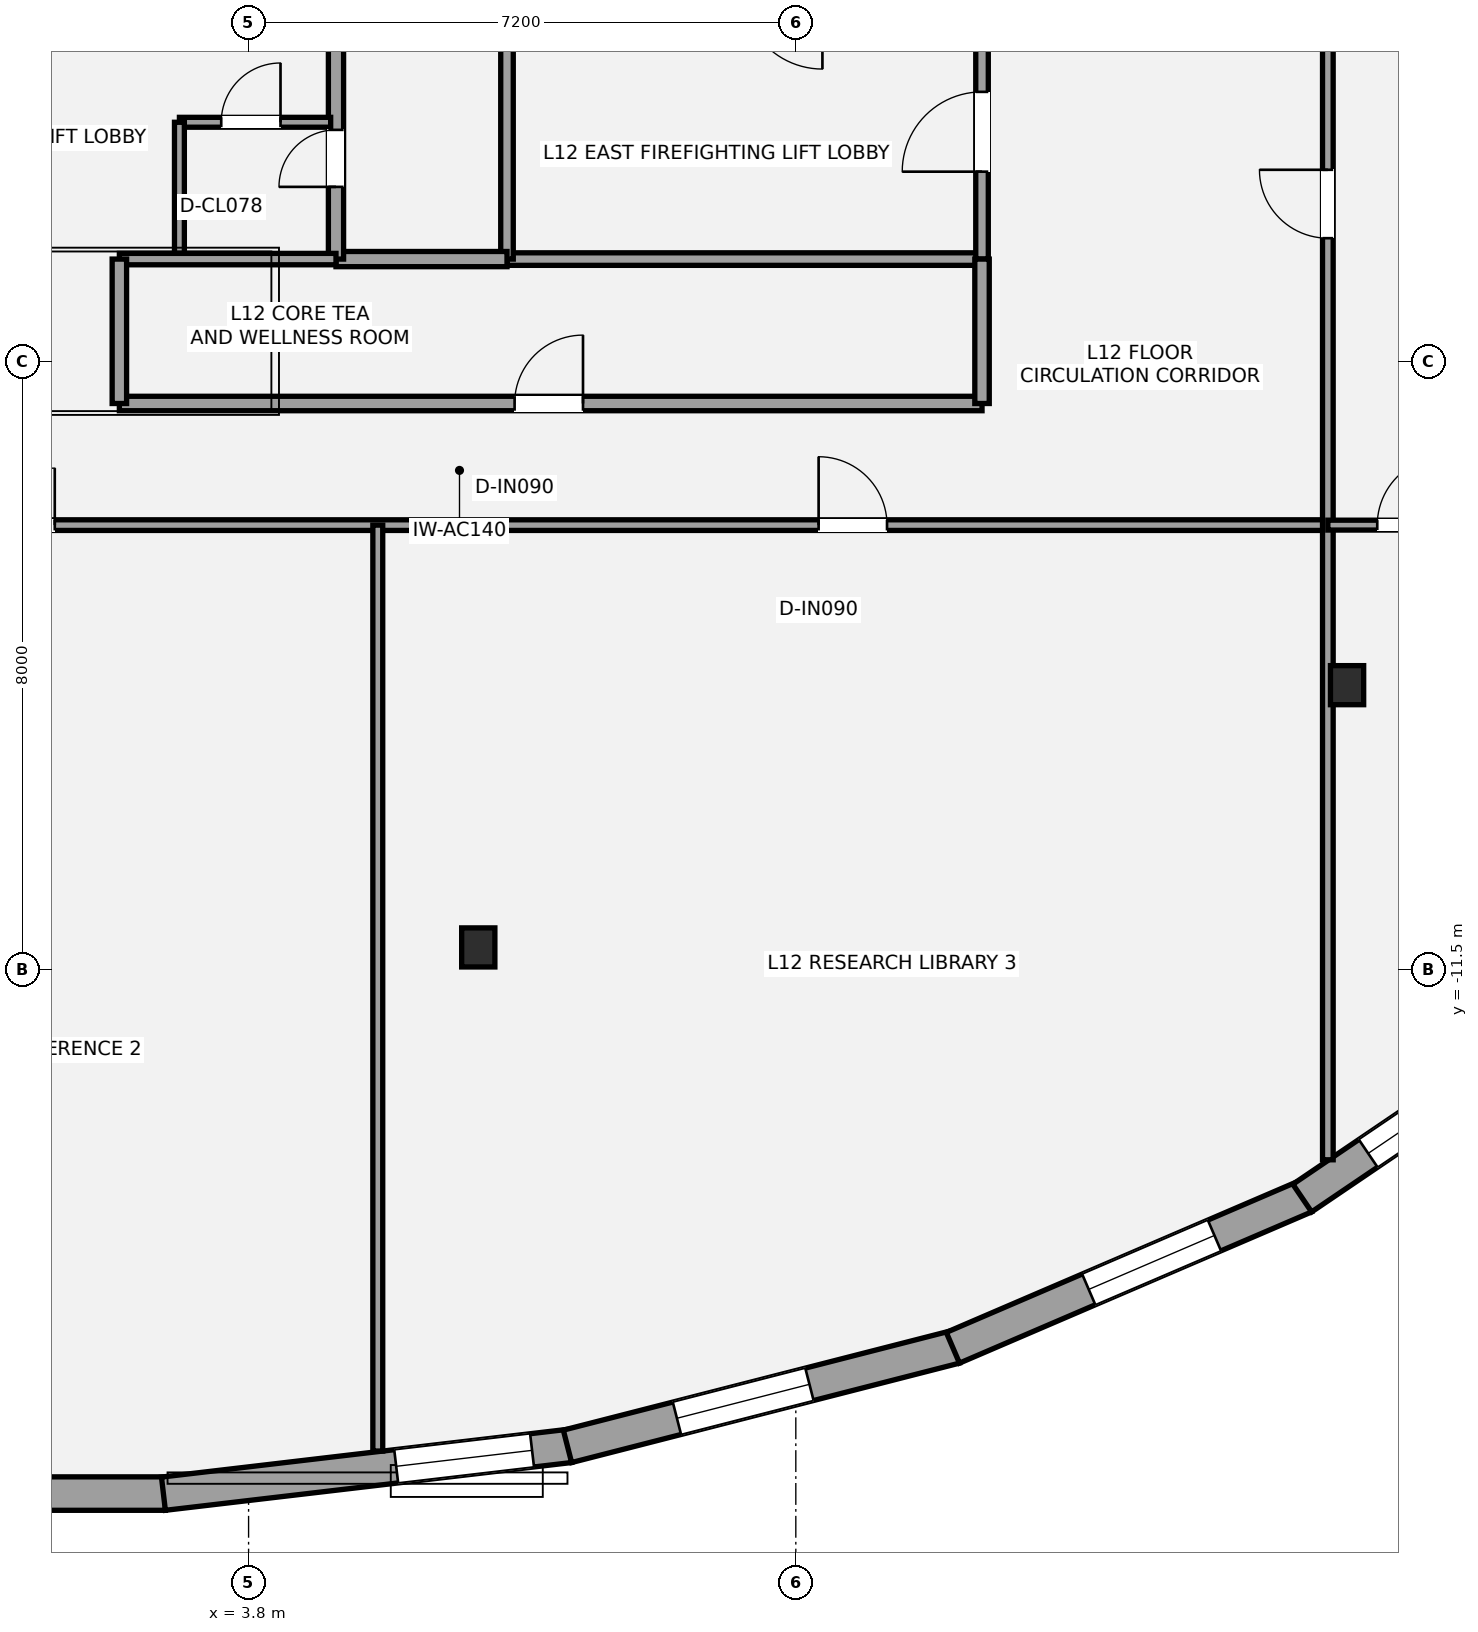
"""IFC4 building model, lengths in metres.
Left out: names, types, materials, properties, quantities, classifications, styles, units other than length and angle.
Written with IfcOpenShell. Run it as: python <this file> out.ifc"""

import sys

from ifc_helpers import new_model, si_unit, direction, frame, frame_2d, origin, origin_2d, place, context, subcontext, project, spatial, rectangle, i_section, extrude, element, fill, save


model = new_model("IFC4")
c1 = context("Model", 3, precision=1e-05, world=origin(), true_north=direction((0.0, 1.0)))
c2 = subcontext(c1, "Body", "Model", "MODEL_VIEW")
j1 = project(units=[si_unit("LENGTHUNIT", "METRE"), si_unit("PLANEANGLEUNIT", "RADIAN")], contexts=[c1])
p1 = place(None, origin())
s1 = spatial("IfcSite", under=j1, at=p1, CompositionType="ELEMENT")
p2 = place(p1, origin())
s2 = spatial("IfcBuilding", under=s1, at=p2, CompositionType="ELEMENT")
p3 = place(p2, frame((0.0, 0.0, 48.6)))
s3 = spatial("IfcBuildingStorey", under=s2, at=p3, CompositionType="ELEMENT", Elevation=48.6)
for number, where, z_axis, x_axis in (
    (1, (6.822, -11.206, 0.0), (0.0, 0.0, 1.0), (1.0, 0.0, 0.0)),
    (2, (18.253, -7.756, 0.0), (0.0, 0.0, 1.0), (1.0, 0.0, 0.0)),
):
    element("IfcColumn", number, at=place(p3, frame(where, z_axis=z_axis, x_axis=x_axis)), inside=s3, PredefinedType="COLUMN", context=c2, shape_type="SweptSolid", body=[
        extrude(i_section(OverallWidth=0.437, OverallDepth=0.514, WebThickness=0.061, FlangeThickness=0.097, at=origin_2d()), origin(), (0.0, 0.0, 1.0), 3.6),
    ])
p4 = place(p3, frame((2.705, -18.391, 0.0), z_axis=(0.0, 0.0, 1.0), x_axis=(-1.0, 0.0, 0.0)))
e3 = element("IfcWall", 3, at=p4, inside=s3, PredefinedType="STANDARD", context=c2, shape_type="SweptSolid", body=[
    extrude(rectangle(XDim=5.41, YDim=0.44, at=frame_2d((2.705, 0.0))), origin(), (0.0, 0.0, 1.0), 2.529),
])
p5 = place(p4, frame((2.028, 0.0, 0.65)))
e4 = element("IfcOpeningElement", 4, at=p5, cuts=e3, PredefinedType="OPENING", context=c2, shape_type="SweptSolid", body=[
    extrude(rectangle(XDim=1.8, YDim=1.7, at=frame_2d((0.9, 0.85))), frame((0.0, 0.23, 0.0), z_axis=(0.0, -1.0, 0.0), x_axis=(1.0, 0.0, 0.0)), (0.0, 0.0, 1.0), 0.46),
])
p6 = place(p3, frame((8.025, -17.764, 0.0), z_axis=(0.0, 0.0, 1.0), x_axis=(-0.993159890371, -0.116762289112, 0.0)))
e5 = element("IfcWall", 5, at=p6, inside=s3, PredefinedType="STANDARD", context=c2, shape_type="SweptSolid", body=[
    extrude(rectangle(XDim=5.382, YDim=0.44, at=frame_2d((2.691, 0.0))), origin(), (0.0, 0.0, 1.0), 2.529),
])
p7 = place(p6, frame((0.498, 0.0, 0.65)))
e6 = element("IfcOpeningElement", 6, at=p7, cuts=e5, PredefinedType="OPENING", context=c2, shape_type="SweptSolid", body=[
    extrude(rectangle(XDim=1.8, YDim=1.7, at=frame_2d((0.9, 0.85))), frame((0.0, 0.23, 0.0), z_axis=(0.0, -1.0, 0.0), x_axis=(1.0, 0.0, 0.0)), (0.0, 0.0, 1.0), 0.46),
])
p8 = place(p3, frame((13.099, -16.462, 0.0), z_axis=(0.0, 0.0, 1.0), x_axis=(-0.968705592422, -0.248212560542, 0.0)))
e7 = element("IfcWall", 7, at=p8, inside=s3, PredefinedType="STANDARD", context=c2, shape_type="SweptSolid", body=[
    extrude(rectangle(XDim=5.268, YDim=0.44, at=frame_2d((2.634, 0.0))), origin(), (0.0, 0.0, 1.0), 2.529),
])
p9 = place(p8, frame((1.981, 0.0, 0.65)))
e8 = element("IfcOpeningElement", 8, at=p9, cuts=e7, PredefinedType="OPENING", context=c2, shape_type="SweptSolid", body=[
    extrude(rectangle(XDim=1.8, YDim=1.7, at=frame_2d((0.9, 0.85))), frame((0.0, 0.23, 0.0), z_axis=(0.0, -1.0, 0.0), x_axis=(1.0, 0.0, 0.0)), (0.0, 0.0, 1.0), 0.46),
])
p10 = place(p3, frame((17.7, -14.483, 0.0), z_axis=(0.0, 0.0, 1.0), x_axis=(-0.918881850071, -0.394532819433, 0.0)))
e9 = element("IfcWall", 9, at=p10, inside=s3, PredefinedType="STANDARD", context=c2, shape_type="SweptSolid", body=[
    extrude(rectangle(XDim=5.042, YDim=0.44, at=frame_2d((2.521, 0.0))), origin(), (0.0, 0.0, 1.0), 2.529),
])
p11 = place(p10, frame((1.297, 0.0, 0.65)))
e10 = element("IfcOpeningElement", 10, at=p11, cuts=e9, PredefinedType="OPENING", context=c2, shape_type="SweptSolid", body=[
    extrude(rectangle(XDim=1.8, YDim=1.7, at=frame_2d((0.9, 0.85))), frame((0.0, 0.23, 0.0), z_axis=(0.0, -1.0, 0.0), x_axis=(1.0, 0.0, 0.0)), (0.0, 0.0, 1.0), 0.46),
])
p12 = place(p3, frame((21.549, -11.87, 0.0), z_axis=(0.0, 0.0, 1.0), x_axis=(-0.827825981515, -0.560984976919, 0.0)))
e11 = element("IfcWall", 11, at=p12, inside=s3, PredefinedType="STANDARD", context=c2, shape_type="SweptSolid", body=[
    extrude(rectangle(XDim=4.695, YDim=0.44, at=frame_2d((2.347, 0.0))), origin(), (0.0, 0.0, 1.0), 2.529),
])
p13 = place(p12, frame((1.846, 0.0, 0.65)))
e12 = element("IfcOpeningElement", 12, at=p13, cuts=e11, PredefinedType="OPENING", context=c2, shape_type="SweptSolid", body=[
    extrude(rectangle(XDim=1.8, YDim=1.7, at=frame_2d((0.9, 0.85))), frame((0.0, 0.23, 0.0), z_axis=(0.0, -1.0, 0.0), x_axis=(1.0, 0.0, 0.0)), (0.0, 0.0, 1.0), 0.46),
])
p14 = place(p3, frame((7.2, -2.15, 0.0), z_axis=(0.0, 0.0, 1.0), x_axis=(1.0, 0.0, 0.0)))
e13 = element("IfcWall", 13, at=p14, inside=s3, PredefinedType="PARTITIONING", context=c2, shape_type="SweptSolid", body=[
    extrude(rectangle(XDim=6.25, YDim=0.165, at=frame_2d((3.125, 0.0))), origin(), (0.0, 0.0, 1.0), 3.4),
])
p15 = place(p3, frame((7.2, -2.15, 0.0), z_axis=(0.0, 0.0, 1.0), x_axis=(0.0, 1.0, 0.0)))
e14 = element("IfcWall", 14, at=p15, inside=s3, PredefinedType="PARTITIONING", context=c2, shape_type="SweptSolid", body=[
    extrude(rectangle(XDim=3.15, YDim=0.165, at=frame_2d((1.575, 0.0))), origin(), (0.0, 0.0, 1.0), 2.853),
])
p16 = place(p3, frame((13.45, -2.15, 0.0), z_axis=(0.0, 0.0, 1.0), x_axis=(0.0, 1.0, 0.0)))
e15 = element("IfcWall", 15, at=p16, inside=s3, PredefinedType="PARTITIONING", context=c2, shape_type="SweptSolid", body=[
    extrude(rectangle(XDim=3.15, YDim=0.165, at=frame_2d((1.575, 0.0))), origin(), (0.0, 0.0, 1.0), 2.853),
])
p17 = place(p16, frame((1.15, 0.0, 0.0)))
e16 = element("IfcOpeningElement", 16, at=p17, cuts=e15, PredefinedType="OPENING", context=c2, shape_type="SweptSolid", body=[
    extrude(rectangle(XDim=1.05, YDim=2.15, at=frame_2d((0.525, 1.075))), frame((0.0, 0.093, 0.0), z_axis=(0.0, -1.0, 0.0), x_axis=(1.0, 0.0, 0.0)), (0.0, 0.0, 1.0), 0.185),
])
p18 = place(p3, frame((4.95, -2.15, 0.0), z_axis=(0.0, 0.0, 1.0), x_axis=(1.0, 0.0, 0.0)))
e17 = element("IfcWall", 17, at=p18, inside=s3, PredefinedType="SOLIDWALL", context=c2, shape_type="SweptSolid", body=[
    extrude(rectangle(XDim=2.25, YDim=0.2, at=frame_2d((1.125, 0.0))), origin(), (0.0, 0.0, 1.0), 3.4),
])
p19 = place(p3, frame((4.95, -2.15, 0.0), z_axis=(0.0, 0.0, 1.0), x_axis=(0.0, 1.0, 0.0)))
e18 = element("IfcWall", 18, at=p19, inside=s3, PredefinedType="SOLIDWALL", context=c2, shape_type="SweptSolid", body=[
    extrude(rectangle(XDim=3.15, YDim=0.2, at=frame_2d((1.575, 0.0))), origin(), (0.0, 0.0, 1.0), 3.4),
])
p20 = place(p19, frame((0.95, 0.0, 0.0)))
e19 = element("IfcOpeningElement", 19, at=p20, cuts=e18, PredefinedType="OPENING", context=c2, shape_type="SweptSolid", body=[
    extrude(rectangle(XDim=0.75, YDim=2.1, at=frame_2d((0.375, 1.05))), frame((0.0, 0.11, 0.0), z_axis=(0.0, -1.0, 0.0), x_axis=(1.0, 0.0, 0.0)), (0.0, 0.0, 1.0), 0.22),
])
p21 = place(p3, frame((2.89, -0.35, 0.0), z_axis=(0.0, 0.0, 1.0), x_axis=(1.0, 0.0, 0.0)))
e20 = element("IfcWall", 20, at=p21, inside=s3, PredefinedType="PARTITIONING", context=c2, shape_type="SweptSolid", body=[
    extrude(rectangle(XDim=1.99, YDim=0.13, at=frame_2d((0.995, 0.0))), origin(), (0.0, 0.0, 1.0), 3.4),
])
p22 = place(p21, frame((0.55, 0.0, 0.0)))
e21 = element("IfcOpeningElement", 21, at=p22, cuts=e20, PredefinedType="OPENING", context=c2, shape_type="SweptSolid", body=[
    extrude(rectangle(XDim=0.78, YDim=2.1, at=frame_2d((0.39, 1.05))), frame((0.0, 0.075, 0.0), z_axis=(0.0, -1.0, 0.0), x_axis=(1.0, 0.0, 0.0)), (0.0, 0.0, 1.0), 0.15),
])
p23 = place(p3, frame((2.89, -2.15, 0.0), z_axis=(0.0, 0.0, 1.0), x_axis=(0.0, 1.0, 0.0)))
e22 = element("IfcWall", 22, at=p23, inside=s3, PredefinedType="PARTITIONING", context=c2, shape_type="SweptSolid", body=[
    extrude(rectangle(XDim=1.8, YDim=0.13, at=frame_2d((0.9, 0.0))), origin(), (0.0, 0.0, 1.0), 3.4),
])
p24 = place(p3, frame((2.1, -4.05, 0.0), z_axis=(0.0, 0.0, 1.0), x_axis=(1.0, 0.0, 0.0)))
e23 = element("IfcWall", 23, at=p24, inside=s3, PredefinedType="PLUMBINGWALL", context=c2, shape_type="SweptSolid", body=[
    extrude(rectangle(XDim=11.35, YDim=0.19, at=frame_2d((5.675, 0.0))), origin(), (0.0, 0.0, 1.0), 2.933),
])
p25 = place(p24, frame((5.2, 0.0, 0.0)))
e24 = element("IfcOpeningElement", 24, at=p25, cuts=e23, PredefinedType="OPENING", context=c2, shape_type="SweptSolid", body=[
    extrude(rectangle(XDim=0.9, YDim=2.1, at=frame_2d((0.45, 1.05))), frame((0.0, 0.105, 0.0), z_axis=(0.0, -1.0, 0.0), x_axis=(1.0, 0.0, 0.0)), (0.0, 0.0, 1.0), 0.21),
])
p26 = place(p3, frame((2.1, -2.15, 0.0), z_axis=(0.0, 0.0, 1.0), x_axis=(1.0, 0.0, 0.0)))
e25 = element("IfcWall", 25, at=p26, inside=s3, PredefinedType="PLUMBINGWALL", context=c2, shape_type="SweptSolid", body=[
    extrude(rectangle(XDim=2.85, YDim=0.15, at=frame_2d((1.425, 0.0))), origin(), (0.0, 0.0, 1.0), 3.4),
])
p27 = place(p3, frame((2.1, -4.05, 0.0), z_axis=(0.0, 0.0, 1.0), x_axis=(0.0, 1.0, 0.0)))
e26 = element("IfcWall", 26, at=p27, inside=s3, PredefinedType="PLUMBINGWALL", context=c2, shape_type="SweptSolid", body=[
    extrude(rectangle(XDim=1.9, YDim=0.19, at=frame_2d((0.95, 0.0))), origin(), (0.0, 0.0, 1.0), 3.4),
])
p28 = place(p3, frame((13.45, -4.05, 0.0), z_axis=(0.0, 0.0, 1.0), x_axis=(0.0, 1.0, 0.0)))
e27 = element("IfcWall", 27, at=p28, inside=s3, PredefinedType="PLUMBINGWALL", context=c2, shape_type="SweptSolid", body=[
    extrude(rectangle(XDim=1.9, YDim=0.19, at=frame_2d((0.95, 0.0))), origin(), (0.0, 0.0, 1.0), 2.853),
])
p29 = place(p3, frame((-16.1, -5.65, 0.0), z_axis=(0.0, 0.0, 1.0), x_axis=(1.0, 0.0, 0.0)))
e28 = element("IfcWall", 28, at=p29, inside=s3, PredefinedType="PARTITIONING", context=c2, shape_type="SweptSolid", body=[
    extrude(rectangle(XDim=34.1, YDim=0.14, at=frame_2d((17.05, 0.0))), origin(), (0.0, 0.0, 1.0), 2.853),
])
p30 = place(p29, frame((5.35, 0.0, 0.0)))
e29 = element("IfcOpeningElement", 29, at=p30, cuts=e28, PredefinedType="OPENING", context=c2, shape_type="SweptSolid", body=[
    extrude(rectangle(XDim=0.9, YDim=2.1, at=frame_2d((0.45, 1.05))), frame((0.0, 0.08, 0.0), z_axis=(0.0, -1.0, 0.0), x_axis=(1.0, 0.0, 0.0)), (0.0, 0.0, 1.0), 0.16),
])
p31 = place(p29, frame((15.85, 0.0, 0.0)))
e30 = element("IfcOpeningElement", 30, at=p31, cuts=e28, PredefinedType="OPENING", context=c2, shape_type="SweptSolid", body=[
    extrude(rectangle(XDim=1.5, YDim=2.15, at=frame_2d((0.75, 1.075))), frame((0.0, 0.08, 0.0), z_axis=(0.0, -1.0, 0.0), x_axis=(1.0, 0.0, 0.0)), (0.0, 0.0, 1.0), 0.16),
])
p32 = place(p29, frame((27.4, 0.0, 0.0)))
e31 = element("IfcOpeningElement", 31, at=p32, cuts=e28, PredefinedType="OPENING", context=c2, shape_type="SweptSolid", body=[
    extrude(rectangle(XDim=0.9, YDim=2.1, at=frame_2d((0.45, 1.05))), frame((0.0, 0.08, 0.0), z_axis=(0.0, -1.0, 0.0), x_axis=(1.0, 0.0, 0.0)), (0.0, 0.0, 1.0), 0.16),
])
p33 = place(p3, frame((18.0, -14.0, 0.0), z_axis=(0.0, 0.0, 1.0), x_axis=(0.0, 1.0, 0.0)))
e32 = element("IfcWall", 32, at=p33, inside=s3, PredefinedType="PARTITIONING", context=c2, shape_type="SweptSolid", body=[
    extrude(rectangle(XDim=19.85, YDim=0.14, at=frame_2d((9.925, 0.0))), origin(), (0.0, 0.0, 1.0), 2.841),
])
p34 = place(p33, frame((12.125, 0.0, 0.0)))
e33 = element("IfcOpeningElement", 33, at=p34, cuts=e32, PredefinedType="OPENING", context=c2, shape_type="SweptSolid", body=[
    extrude(rectangle(XDim=0.9, YDim=2.1, at=frame_2d((0.45, 1.05))), frame((0.0, 0.08, 0.0), z_axis=(0.0, -1.0, 0.0), x_axis=(1.0, 0.0, 0.0)), (0.0, 0.0, 1.0), 0.16),
])
p35 = place(p33, frame((17.875, 0.0, 0.0)))
e34 = element("IfcOpeningElement", 34, at=p35, cuts=e32, PredefinedType="OPENING", context=c2, shape_type="SweptSolid", body=[
    extrude(rectangle(XDim=0.9, YDim=2.1, at=frame_2d((0.45, 1.05))), frame((0.0, 0.08, 0.0), z_axis=(0.0, -1.0, 0.0), x_axis=(1.0, 0.0, 0.0)), (0.0, 0.0, 1.0), 0.16),
])
p36 = place(p3, frame((5.5, -17.832, 0.0), z_axis=(0.0, 0.0, 1.0), x_axis=(0.0, 1.0, 0.0)))
e35 = element("IfcWall", 35, at=p36, inside=s3, PredefinedType="PARTITIONING", context=c2, shape_type="SweptSolid", body=[
    extrude(rectangle(XDim=12.182, YDim=0.13, at=frame_2d((6.091, 0.0))), origin(), (0.0, 0.0, 1.0), 3.4),
])
p37 = place(p3, frame((18.0, -5.65, 0.0), z_axis=(0.0, 0.0, 1.0), x_axis=(1.0, 0.0, 0.0)))
e36 = element("IfcWall", 36, at=p37, inside=s3, PredefinedType="PARTITIONING", context=c2, shape_type="SweptSolid", body=[
    extrude(rectangle(XDim=7.917, YDim=0.13, at=frame_2d((3.958, 0.0))), origin(), (0.0, 0.0, 1.0), 2.779),
])
p38 = place(p37, frame((0.65, 0.0, 0.0)))
e37 = element("IfcOpeningElement", 37, at=p38, cuts=e36, PredefinedType="OPENING", context=c2, shape_type="SweptSolid", body=[
    extrude(rectangle(XDim=0.9, YDim=2.1, at=frame_2d((0.45, 1.05))), frame((0.0, 0.075, 0.0), z_axis=(0.0, -1.0, 0.0), x_axis=(1.0, 0.0, 0.0)), (0.0, 0.0, 1.0), 0.15),
])
p39 = place(p7, origin())
e38 = element("IfcWindow", 38, at=p39, inside=s3, PartitioningType="SINGLE_PANEL", PredefinedType="WINDOW", context=c2, shape_type="SweptSolid", body=[
    extrude(rectangle(XDim=1.8, YDim=1.7, at=frame_2d((0.9, 0.85))), frame((0.0, -0.01, 0.0), z_axis=(0.0, -1.0, 0.0), x_axis=(1.0, 0.0, 0.0)), (0.0, 0.0, 1.0), 0.06),
])
fill(e6, e38)
p40 = place(p9, origin())
e39 = element("IfcWindow", 39, at=p40, inside=s3, PartitioningType="SINGLE_PANEL", PredefinedType="WINDOW", context=c2, shape_type="SweptSolid", body=[
    extrude(rectangle(XDim=1.8, YDim=1.7, at=frame_2d((0.9, 0.85))), frame((0.0, -0.01, 0.0), z_axis=(0.0, -1.0, 0.0), x_axis=(1.0, 0.0, 0.0)), (0.0, 0.0, 1.0), 0.06),
])
fill(e8, e39)
p41 = place(p11, origin())
e40 = element("IfcWindow", 40, at=p41, inside=s3, PartitioningType="SINGLE_PANEL", PredefinedType="WINDOW", context=c2, shape_type="SweptSolid", body=[
    extrude(rectangle(XDim=1.8, YDim=1.7, at=frame_2d((0.9, 0.85))), frame((0.0, -0.01, 0.0), z_axis=(0.0, -1.0, 0.0), x_axis=(1.0, 0.0, 0.0)), (0.0, 0.0, 1.0), 0.06),
])
fill(e10, e40)
p42 = place(p13, origin())
e41 = element("IfcWindow", 41, at=p42, inside=s3, PartitioningType="SINGLE_PANEL", PredefinedType="WINDOW", context=c2, shape_type="SweptSolid", body=[
    extrude(rectangle(XDim=1.8, YDim=1.7, at=frame_2d((0.9, 0.85))), frame((0.0, -0.01, 0.0), z_axis=(0.0, -1.0, 0.0), x_axis=(1.0, 0.0, 0.0)), (0.0, 0.0, 1.0), 0.06),
])
fill(e12, e41)
p43 = place(p17, origin())
e42 = element("IfcDoor", 42, at=p43, inside=s3, OperationType="SINGLE_SWING_LEFT", PredefinedType="DOOR", context=c2, shape_type="SweptSolid", body=[
    extrude(rectangle(XDim=1.05, YDim=2.15, at=frame_2d((0.525, 1.075))), frame((0.0, 0.025, 0.0), z_axis=(0.0, -1.0, 0.0), x_axis=(1.0, 0.0, 0.0)), (0.0, 0.0, 1.0), 0.05),
])
fill(e16, e42)
p44 = place(p20, origin())
e43 = element("IfcDoor", 43, at=p44, inside=s3, OperationType="SINGLE_SWING_LEFT", PredefinedType="DOOR", context=c2, shape_type="SweptSolid", body=[
    extrude(rectangle(XDim=0.75, YDim=2.1, at=frame_2d((0.375, 1.05))), frame((0.0, 0.025, 0.0), z_axis=(0.0, -1.0, 0.0), x_axis=(1.0, 0.0, 0.0)), (0.0, 0.0, 1.0), 0.05),
])
fill(e19, e43)
p45 = place(p22, origin())
e44 = element("IfcDoor", 44, at=p45, inside=s3, OperationType="SINGLE_SWING_RIGHT", PredefinedType="DOOR", context=c2, shape_type="SweptSolid", body=[
    extrude(rectangle(XDim=0.78, YDim=2.1, at=frame_2d((0.39, 1.05))), frame((0.0, 0.025, 0.0), z_axis=(0.0, -1.0, 0.0), x_axis=(1.0, 0.0, 0.0)), (0.0, 0.0, 1.0), 0.05),
])
fill(e21, e44)
p46 = place(p25, origin())
e45 = element("IfcDoor", 45, at=p46, inside=s3, OperationType="SINGLE_SWING_RIGHT", PredefinedType="DOOR", context=c2, shape_type="SweptSolid", body=[
    extrude(rectangle(XDim=0.9, YDim=2.1, at=frame_2d((0.45, 1.05))), frame((0.0, 0.025, 0.0), z_axis=(0.0, -1.0, 0.0), x_axis=(1.0, 0.0, 0.0)), (0.0, 0.0, 1.0), 0.05),
])
fill(e24, e45)
p47 = place(p31, origin())
e46 = element("IfcDoor", 46, at=p47, inside=s3, OperationType="DOUBLE_DOOR_SINGLE_SWING", PredefinedType="DOOR", context=c2, shape_type="SweptSolid", body=[
    extrude(rectangle(XDim=1.5, YDim=2.15, at=frame_2d((0.75, 1.075))), frame((0.0, 0.025, 0.0), z_axis=(0.0, -1.0, 0.0), x_axis=(1.0, 0.0, 0.0)), (0.0, 0.0, 1.0), 0.05),
])
fill(e30, e46)
p48 = place(p32, origin())
e47 = element("IfcDoor", 47, at=p48, inside=s3, OperationType="SINGLE_SWING_LEFT", PredefinedType="DOOR", context=c2, shape_type="SweptSolid", body=[
    extrude(rectangle(XDim=0.9, YDim=2.1, at=frame_2d((0.45, 1.05))), frame((0.0, 0.025, 0.0), z_axis=(0.0, -1.0, 0.0), x_axis=(1.0, 0.0, 0.0)), (0.0, 0.0, 1.0), 0.05),
])
fill(e31, e47)
p49 = place(p38, origin())
e48 = element("IfcDoor", 48, at=p49, inside=s3, OperationType="SINGLE_SWING_RIGHT", PredefinedType="DOOR", context=c2, shape_type="SweptSolid", body=[
    extrude(rectangle(XDim=0.9, YDim=2.1, at=frame_2d((0.45, 1.05))), frame((0.0, 0.025, 0.0), z_axis=(0.0, -1.0, 0.0), x_axis=(1.0, 0.0, 0.0)), (0.0, 0.0, 1.0), 0.05),
])
fill(e37, e48)
p50 = place(p34, origin())
e49 = element("IfcDoor", 49, at=p50, inside=s3, OperationType="SINGLE_SWING_RIGHT", PredefinedType="DOOR", context=c2, shape_type="SweptSolid", body=[
    extrude(rectangle(XDim=0.9, YDim=2.1, at=frame_2d((0.45, 1.05))), frame((0.0, 0.025, 0.0), z_axis=(0.0, -1.0, 0.0), x_axis=(1.0, 0.0, 0.0)), (0.0, 0.0, 1.0), 0.05),
])
fill(e33, e49)
save(model, sys.argv[1])
